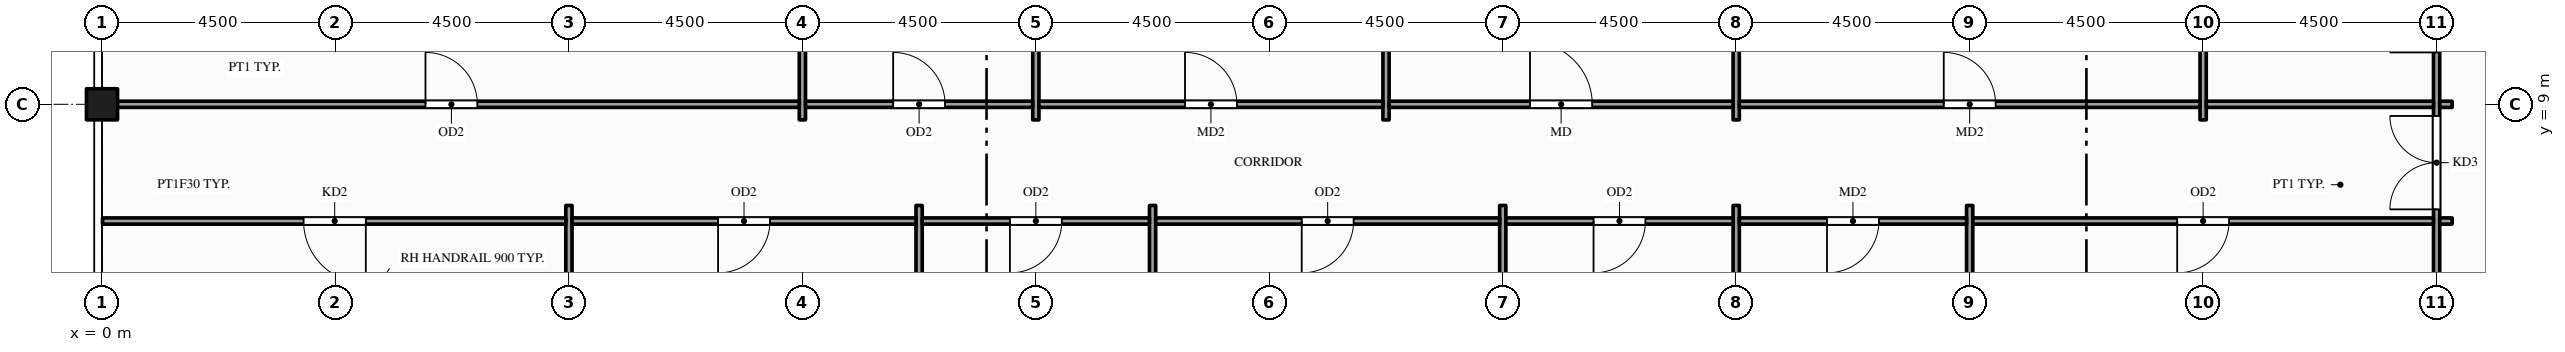
"""IFC4 building model, lengths in metres.
Left out: names, types, materials, properties, quantities, classifications, styles, units other than length and angle.
Written with IfcOpenShell. Run it as: python <this file> out.ifc"""

import sys

from ifc_helpers import new_model, si_unit, direction, frame, frame_2d, origin, origin_2d, place, context, subcontext, project, spatial, rectangle, hollow_rectangle, extrude, element, fill, save


model = new_model("IFC4")
c1 = context("Model", 3, precision=1e-05, world=origin(), true_north=direction((0.0, 1.0)))
c2 = subcontext(c1, "Body", "Model", "MODEL_VIEW")
j1 = project(units=[si_unit("LENGTHUNIT", "METRE"), si_unit("PLANEANGLEUNIT", "RADIAN")], contexts=[c1])
p1 = place(None, origin())
s1 = spatial("IfcSite", under=j1, at=p1, CompositionType="ELEMENT")
p2 = place(p1, origin())
s2 = spatial("IfcBuilding", under=s1, at=p2, CompositionType="ELEMENT")
p3 = place(p2, frame((0.0, 0.0, 336.5)))
s3 = spatial("IfcBuildingStorey", under=s2, at=p3, CompositionType="ELEMENT", Elevation=336.5)
p4 = place(p3, frame((0.0, 9.0, -0.15), z_axis=(0.0, 0.0, 1.0), x_axis=(1.0, 0.0, 0.0)))
e1 = element("IfcColumn", 1, at=p4, inside=s3, PredefinedType="COLUMN", context=c2, shape_type="SweptSolid", body=[
    extrude(hollow_rectangle(XDim=0.6, YDim=0.6, WallThickness=0.03, at=origin_2d()), origin(), (0.0, 0.0, 1.0), 4.5),
])
p5 = place(p3, frame((9.0, 3.875, 0.0), z_axis=(0.0, 0.0, 1.0), x_axis=(0.0, 1.0, 0.0)))
e2 = element("IfcWall", 2, at=p5, inside=s3, PredefinedType="PARTITIONING", context=c2, shape_type="SweptSolid", body=[
    extrude(rectangle(XDim=3.175, YDim=0.12, at=frame_2d((1.587, 0.0))), origin(), (0.0, 0.0, 1.0), 3.359),
])
p6 = place(p3, frame((13.5, 8.7, 0.0), z_axis=(0.0, 0.0, 1.0), x_axis=(0.0, 1.0, 0.0)))
e3 = element("IfcWall", 3, at=p6, inside=s3, PredefinedType="PARTITIONING", context=c2, shape_type="SweptSolid", body=[
    extrude(rectangle(XDim=13.79, YDim=0.12, at=frame_2d((6.895, 0.0))), origin(), (0.0, 0.0, 1.0), 3.359),
])
p7 = place(p3, frame((15.75, 0.01, 0.0), z_axis=(0.0, 0.0, 1.0), x_axis=(0.0, 1.0, 0.0)))
e4 = element("IfcWall", 4, at=p7, inside=s3, PredefinedType="PARTITIONING", context=c2, shape_type="SweptSolid", body=[
    extrude(rectangle(XDim=7.04, YDim=0.12, at=frame_2d((3.52, 0.0))), origin(), (0.0, 0.0, 1.0), 3.359),
])
p8 = place(p3, frame((18.0, 8.7, 0.0), z_axis=(0.0, 0.0, 1.0), x_axis=(0.0, 1.0, 0.0)))
e5 = element("IfcWall", 5, at=p8, inside=s3, PredefinedType="PARTITIONING", context=c2, shape_type="SweptSolid", body=[
    extrude(rectangle(XDim=13.79, YDim=0.12, at=frame_2d((6.895, 0.0))), origin(), (0.0, 0.0, 1.0), 3.359),
])
p9 = place(p3, frame((20.25, 0.01, 0.0), z_axis=(0.0, 0.0, 1.0), x_axis=(0.0, 1.0, 0.0)))
e6 = element("IfcWall", 6, at=p9, inside=s3, PredefinedType="PARTITIONING", context=c2, shape_type="SweptSolid", body=[
    extrude(rectangle(XDim=7.04, YDim=0.12, at=frame_2d((3.52, 0.0))), origin(), (0.0, 0.0, 1.0), 3.359),
])
p10 = place(p3, frame((24.75, 8.7, 0.0), z_axis=(0.0, 0.0, 1.0), x_axis=(0.0, 1.0, 0.0)))
e7 = element("IfcWall", 7, at=p10, inside=s3, PredefinedType="PARTITIONING", context=c2, shape_type="SweptSolid", body=[
    extrude(rectangle(XDim=13.79, YDim=0.12, at=frame_2d((6.895, 0.0))), origin(), (0.0, 0.0, 1.0), 3.359),
])
for number, where, z_axis, x_axis in (
    (8, (27.0, 0.01, 0.0), (0.0, 0.0, 1.0), (0.0, 1.0, 0.0)),
    (9, (31.5, 0.01, 0.0), (0.0, 0.0, 1.0), (0.0, 1.0, 0.0)),
):
    element("IfcWall", number, at=place(p3, frame(where, z_axis=z_axis, x_axis=x_axis)), inside=s3, PredefinedType="PARTITIONING", context=c2, shape_type="SweptSolid", body=[
        extrude(rectangle(XDim=7.04, YDim=0.12, at=frame_2d((3.52, 0.0))), origin(), (0.0, 0.0, 1.0), 3.359),
    ])
p11 = place(p3, frame((31.5, 8.7, 0.0), z_axis=(0.0, 0.0, 1.0), x_axis=(0.0, 1.0, 0.0)))
e10 = element("IfcWall", 10, at=p11, inside=s3, PredefinedType="PARTITIONING", context=c2, shape_type="SweptSolid", body=[
    extrude(rectangle(XDim=13.79, YDim=0.12, at=frame_2d((6.895, 0.0))), origin(), (0.0, 0.0, 1.0), 3.359),
])
p12 = place(p3, frame((36.0, 0.01, 0.0), z_axis=(0.0, 0.0, 1.0), x_axis=(0.0, 1.0, 0.0)))
e11 = element("IfcWall", 11, at=p12, inside=s3, PredefinedType="PARTITIONING", context=c2, shape_type="SweptSolid", body=[
    extrude(rectangle(XDim=7.04, YDim=0.12, at=frame_2d((3.52, 0.0))), origin(), (0.0, 0.0, 1.0), 3.359),
])
p13 = place(p3, frame((40.5, 8.7, 0.0), z_axis=(0.0, 0.0, 1.0), x_axis=(0.0, 1.0, 0.0)))
e12 = element("IfcWall", 12, at=p13, inside=s3, PredefinedType="PARTITIONING", context=c2, shape_type="SweptSolid", body=[
    extrude(rectangle(XDim=13.79, YDim=0.12, at=frame_2d((6.895, 0.0))), origin(), (0.0, 0.0, 1.0), 3.359),
])
p14 = place(p3, frame((45.0, 0.01, 0.0), z_axis=(0.0, 0.0, 1.0), x_axis=(0.0, 1.0, 0.0)))
e13 = element("IfcWall", 13, at=p14, inside=s3, PredefinedType="PARTITIONING", context=c2, shape_type="SweptSolid", body=[
    extrude(rectangle(XDim=22.48, YDim=0.12, at=frame_2d((11.24, 0.0))), origin(), (0.0, 0.0, 1.0), 3.359),
])
p15 = place(p14, frame((6.965, 0.0, 0.0)))
e14 = element("IfcOpeningElement", 14, at=p15, cuts=e13, PredefinedType="OPENING", context=c2, shape_type="SweptSolid", body=[
    extrude(rectangle(XDim=1.8, YDim=2.1, at=frame_2d((0.9, 1.05))), frame((0.0, 0.07, 0.0), z_axis=(0.0, -1.0, 0.0), x_axis=(1.0, 0.0, 0.0)), (0.0, 0.0, 1.0), 0.14),
])
p16 = place(p14, frame((9.99, 0.0, 0.0)))
e15 = element("IfcOpeningElement", 15, at=p16, cuts=e13, PredefinedType="OPENING", context=c2, shape_type="SweptSolid", body=[
    extrude(rectangle(XDim=0.9, YDim=2.1, at=frame_2d((0.45, 1.05))), frame((0.0, 0.07, 0.0), z_axis=(0.0, -1.0, 0.0), x_axis=(1.0, 0.0, 0.0)), (0.0, 0.0, 1.0), 0.14),
])
p17 = place(p14, frame((15.29, 0.0, 0.0)))
e16 = element("IfcOpeningElement", 16, at=p17, cuts=e13, PredefinedType="OPENING", context=c2, shape_type="SweptSolid", body=[
    extrude(rectangle(XDim=0.9, YDim=2.1, at=frame_2d((0.45, 1.05))), frame((0.0, 0.07, 0.0), z_axis=(0.0, -1.0, 0.0), x_axis=(1.0, 0.0, 0.0)), (0.0, 0.0, 1.0), 0.14),
])
p18 = place(p14, frame((20.49, 0.0, 0.0)))
e17 = element("IfcOpeningElement", 17, at=p18, cuts=e13, PredefinedType="OPENING", context=c2, shape_type="SweptSolid", body=[
    extrude(rectangle(XDim=1.0, YDim=2.1, at=frame_2d((0.5, 1.05))), frame((0.0, 0.07, 0.0), z_axis=(0.0, -1.0, 0.0), x_axis=(1.0, 0.0, 0.0)), (0.0, 0.0, 1.0), 0.14),
])
p19 = place(p3, frame((0.01, 6.75, 0.0), z_axis=(0.0, 0.0, 1.0), x_axis=(1.0, 0.0, 0.0)))
e18 = element("IfcWall", 18, at=p19, inside=s3, PredefinedType="PARTITIONING", context=c2, shape_type="SweptSolid", body=[
    extrude(rectangle(XDim=8.93, YDim=0.12, at=frame_2d((4.465, 0.0))), origin(), (0.0, 0.0, 1.0), 3.359),
])
p20 = place(p19, frame((3.875, 0.0, 0.0)))
e19 = element("IfcOpeningElement", 19, at=p20, cuts=e18, PredefinedType="OPENING", context=c2, shape_type="SweptSolid", body=[
    extrude(rectangle(XDim=1.2, YDim=2.1, at=frame_2d((0.6, 1.05))), frame((0.0, 0.07, 0.0), z_axis=(0.0, -1.0, 0.0), x_axis=(1.0, 0.0, 0.0)), (0.0, 0.0, 1.0), 0.14),
])
p21 = place(p3, frame((9.06, 6.75, 0.0), z_axis=(0.0, 0.0, 1.0), x_axis=(1.0, 0.0, 0.0)))
e20 = element("IfcWall", 20, at=p21, inside=s3, PredefinedType="PARTITIONING", context=c2, shape_type="SweptSolid", body=[
    extrude(rectangle(XDim=6.63, YDim=0.12, at=frame_2d((3.315, 0.0))), origin(), (0.0, 0.0, 1.0), 3.359),
])
p22 = place(p21, frame((2.815, 0.0, 0.0)))
e21 = element("IfcOpeningElement", 21, at=p22, cuts=e20, PredefinedType="OPENING", context=c2, shape_type="SweptSolid", body=[
    extrude(rectangle(XDim=1.0, YDim=2.1, at=frame_2d((0.5, 1.05))), frame((0.0, 0.07, 0.0), z_axis=(0.0, -1.0, 0.0), x_axis=(1.0, 0.0, 0.0)), (0.0, 0.0, 1.0), 0.14),
])
p23 = place(p3, frame((15.81, 6.75, 0.0), z_axis=(0.0, 0.0, 1.0), x_axis=(1.0, 0.0, 0.0)))
e22 = element("IfcWall", 22, at=p23, inside=s3, PredefinedType="PARTITIONING", context=c2, shape_type="SweptSolid", body=[
    extrude(rectangle(XDim=4.38, YDim=0.12, at=frame_2d((2.19, 0.0))), origin(), (0.0, 0.0, 1.0), 3.359),
])
p24 = place(p23, frame((1.69, 0.0, 0.0)))
e23 = element("IfcOpeningElement", 23, at=p24, cuts=e22, PredefinedType="OPENING", context=c2, shape_type="SweptSolid", body=[
    extrude(rectangle(XDim=1.0, YDim=2.1, at=frame_2d((0.5, 1.05))), frame((0.0, 0.07, 0.0), z_axis=(0.0, -1.0, 0.0), x_axis=(1.0, 0.0, 0.0)), (0.0, 0.0, 1.0), 0.14),
])
p25 = place(p3, frame((20.31, 6.75, 0.0), z_axis=(0.0, 0.0, 1.0), x_axis=(1.0, 0.0, 0.0)))
e24 = element("IfcWall", 24, at=p25, inside=s3, PredefinedType="PARTITIONING", context=c2, shape_type="SweptSolid", body=[
    extrude(rectangle(XDim=6.63, YDim=0.12, at=frame_2d((3.315, 0.0))), origin(), (0.0, 0.0, 1.0), 3.359),
])
p26 = place(p25, frame((2.815, 0.0, 0.0)))
e25 = element("IfcOpeningElement", 25, at=p26, cuts=e24, PredefinedType="OPENING", context=c2, shape_type="SweptSolid", body=[
    extrude(rectangle(XDim=1.0, YDim=2.1, at=frame_2d((0.5, 1.05))), frame((0.0, 0.07, 0.0), z_axis=(0.0, -1.0, 0.0), x_axis=(1.0, 0.0, 0.0)), (0.0, 0.0, 1.0), 0.14),
])
p27 = place(p3, frame((27.06, 6.75, 0.0), z_axis=(0.0, 0.0, 1.0), x_axis=(1.0, 0.0, 0.0)))
e26 = element("IfcWall", 26, at=p27, inside=s3, PredefinedType="PARTITIONING", context=c2, shape_type="SweptSolid", body=[
    extrude(rectangle(XDim=4.38, YDim=0.12, at=frame_2d((2.19, 0.0))), origin(), (0.0, 0.0, 1.0), 3.359),
])
p28 = place(p27, frame((1.69, 0.0, 0.0)))
e27 = element("IfcOpeningElement", 27, at=p28, cuts=e26, PredefinedType="OPENING", context=c2, shape_type="SweptSolid", body=[
    extrude(rectangle(XDim=1.0, YDim=2.1, at=frame_2d((0.5, 1.05))), frame((0.0, 0.07, 0.0), z_axis=(0.0, -1.0, 0.0), x_axis=(1.0, 0.0, 0.0)), (0.0, 0.0, 1.0), 0.14),
])
p29 = place(p3, frame((31.56, 6.75, 0.0), z_axis=(0.0, 0.0, 1.0), x_axis=(1.0, 0.0, 0.0)))
e28 = element("IfcWall", 28, at=p29, inside=s3, PredefinedType="PARTITIONING", context=c2, shape_type="SweptSolid", body=[
    extrude(rectangle(XDim=4.38, YDim=0.12, at=frame_2d((2.19, 0.0))), origin(), (0.0, 0.0, 1.0), 3.359),
])
p30 = place(p29, frame((1.69, 0.0, 0.0)))
e29 = element("IfcOpeningElement", 29, at=p30, cuts=e28, PredefinedType="OPENING", context=c2, shape_type="SweptSolid", body=[
    extrude(rectangle(XDim=1.0, YDim=2.1, at=frame_2d((0.5, 1.05))), frame((0.0, 0.07, 0.0), z_axis=(0.0, -1.0, 0.0), x_axis=(1.0, 0.0, 0.0)), (0.0, 0.0, 1.0), 0.14),
])
p31 = place(p3, frame((36.06, 6.75, 0.0), z_axis=(0.0, 0.0, 1.0), x_axis=(1.0, 0.0, 0.0)))
e30 = element("IfcWall", 30, at=p31, inside=s3, PredefinedType="PARTITIONING", context=c2, shape_type="SweptSolid", body=[
    extrude(rectangle(XDim=8.88, YDim=0.12, at=frame_2d((4.44, 0.0))), origin(), (0.0, 0.0, 1.0), 3.359),
])
p32 = place(p31, frame((3.94, 0.0, 0.0)))
e31 = element("IfcOpeningElement", 31, at=p32, cuts=e30, PredefinedType="OPENING", context=c2, shape_type="SweptSolid", body=[
    extrude(rectangle(XDim=1.0, YDim=2.1, at=frame_2d((0.5, 1.05))), frame((0.0, 0.07, 0.0), z_axis=(0.0, -1.0, 0.0), x_axis=(1.0, 0.0, 0.0)), (0.0, 0.0, 1.0), 0.14),
])
p33 = place(p3, frame((45.06, 6.75, 0.0), z_axis=(0.0, 0.0, 1.0), x_axis=(1.0, 0.0, 0.0)))
e32 = element("IfcWall", 32, at=p33, inside=s3, PredefinedType="PARTITIONING", context=c2, shape_type="SweptSolid", body=[
    extrude(rectangle(XDim=0.24, YDim=0.12, at=frame_2d((0.12, 0.0))), origin(), (0.0, 0.0, 1.0), 3.359),
])
p34 = place(p3, frame((0.01, 9.0, 0.0), z_axis=(0.0, 0.0, 1.0), x_axis=(1.0, 0.0, 0.0)))
e33 = element("IfcWall", 33, at=p34, inside=s3, PredefinedType="PARTITIONING", context=c2, shape_type="SweptSolid", body=[
    extrude(rectangle(XDim=13.43, YDim=0.12, at=frame_2d((6.715, 0.0))), origin(), (0.0, 0.0, 1.0), 3.359),
])
p35 = place(p34, frame((6.225, 0.0, 0.0)))
e34 = element("IfcOpeningElement", 34, at=p35, cuts=e33, PredefinedType="OPENING", context=c2, shape_type="SweptSolid", body=[
    extrude(rectangle(XDim=1.0, YDim=2.1, at=frame_2d((0.5, 1.05))), frame((0.0, 0.07, 0.0), z_axis=(0.0, -1.0, 0.0), x_axis=(1.0, 0.0, 0.0)), (0.0, 0.0, 1.0), 0.14),
])
p36 = place(p3, frame((13.56, 9.0, 0.0), z_axis=(0.0, 0.0, 1.0), x_axis=(1.0, 0.0, 0.0)))
e35 = element("IfcWall", 35, at=p36, inside=s3, PredefinedType="PARTITIONING", context=c2, shape_type="SweptSolid", body=[
    extrude(rectangle(XDim=4.38, YDim=0.12, at=frame_2d((2.19, 0.0))), origin(), (0.0, 0.0, 1.0), 3.359),
])
p37 = place(p36, frame((1.69, 0.0, 0.0)))
e36 = element("IfcOpeningElement", 36, at=p37, cuts=e35, PredefinedType="OPENING", context=c2, shape_type="SweptSolid", body=[
    extrude(rectangle(XDim=1.0, YDim=2.1, at=frame_2d((0.5, 1.05))), frame((0.0, 0.07, 0.0), z_axis=(0.0, -1.0, 0.0), x_axis=(1.0, 0.0, 0.0)), (0.0, 0.0, 1.0), 0.14),
])
p38 = place(p3, frame((18.06, 9.0, 0.0), z_axis=(0.0, 0.0, 1.0), x_axis=(1.0, 0.0, 0.0)))
e37 = element("IfcWall", 37, at=p38, inside=s3, PredefinedType="PARTITIONING", context=c2, shape_type="SweptSolid", body=[
    extrude(rectangle(XDim=6.63, YDim=0.12, at=frame_2d((3.315, 0.0))), origin(), (0.0, 0.0, 1.0), 3.359),
])
p39 = place(p38, frame((2.815, 0.0, 0.0)))
e38 = element("IfcOpeningElement", 38, at=p39, cuts=e37, PredefinedType="OPENING", context=c2, shape_type="SweptSolid", body=[
    extrude(rectangle(XDim=1.0, YDim=2.1, at=frame_2d((0.5, 1.05))), frame((0.0, 0.07, 0.0), z_axis=(0.0, -1.0, 0.0), x_axis=(1.0, 0.0, 0.0)), (0.0, 0.0, 1.0), 0.14),
])
p40 = place(p3, frame((24.81, 9.0, 0.0), z_axis=(0.0, 0.0, 1.0), x_axis=(1.0, 0.0, 0.0)))
e39 = element("IfcWall", 39, at=p40, inside=s3, PredefinedType="PARTITIONING", context=c2, shape_type="SweptSolid", body=[
    extrude(rectangle(XDim=6.63, YDim=0.12, at=frame_2d((3.315, 0.0))), origin(), (0.0, 0.0, 1.0), 3.359),
])
p41 = place(p40, frame((2.715, 0.0, 0.0)))
e40 = element("IfcOpeningElement", 40, at=p41, cuts=e39, PredefinedType="OPENING", context=c2, shape_type="SweptSolid", body=[
    extrude(rectangle(XDim=1.2, YDim=2.1, at=frame_2d((0.6, 1.05))), frame((0.0, 0.07, 0.0), z_axis=(0.0, -1.0, 0.0), x_axis=(1.0, 0.0, 0.0)), (0.0, 0.0, 1.0), 0.14),
])
p42 = place(p3, frame((31.56, 9.0, 0.0), z_axis=(0.0, 0.0, 1.0), x_axis=(1.0, 0.0, 0.0)))
e41 = element("IfcWall", 41, at=p42, inside=s3, PredefinedType="PARTITIONING", context=c2, shape_type="SweptSolid", body=[
    extrude(rectangle(XDim=8.88, YDim=0.12, at=frame_2d((4.44, 0.0))), origin(), (0.0, 0.0, 1.0), 3.359),
])
p43 = place(p42, frame((3.94, 0.0, 0.0)))
e42 = element("IfcOpeningElement", 42, at=p43, cuts=e41, PredefinedType="OPENING", context=c2, shape_type="SweptSolid", body=[
    extrude(rectangle(XDim=1.0, YDim=2.1, at=frame_2d((0.5, 1.05))), frame((0.0, 0.07, 0.0), z_axis=(0.0, -1.0, 0.0), x_axis=(1.0, 0.0, 0.0)), (0.0, 0.0, 1.0), 0.14),
])
p44 = place(p3, frame((40.56, 9.0, 0.0), z_axis=(0.0, 0.0, 1.0), x_axis=(1.0, 0.0, 0.0)))
e43 = element("IfcWall", 43, at=p44, inside=s3, PredefinedType="PARTITIONING", context=c2, shape_type="SweptSolid", body=[
    extrude(rectangle(XDim=4.38, YDim=0.12, at=frame_2d((2.19, 0.0))), origin(), (0.0, 0.0, 1.0), 3.359),
])
p45 = place(p3, frame((45.06, 9.0, 0.0), z_axis=(0.0, 0.0, 1.0), x_axis=(1.0, 0.0, 0.0)))
e44 = element("IfcWall", 44, at=p45, inside=s3, PredefinedType="PARTITIONING", context=c2, shape_type="SweptSolid", body=[
    extrude(rectangle(XDim=0.24, YDim=0.12, at=frame_2d((0.12, 0.0))), origin(), (0.0, 0.0, 1.0), 3.359),
])
p46 = place(p15, origin())
e45 = element("IfcDoor", 45, at=p46, inside=s3, OperationType="DOUBLE_DOOR_SINGLE_SWING", PredefinedType="DOOR", context=c2, shape_type="SweptSolid", body=[
    extrude(rectangle(XDim=1.8, YDim=2.1, at=frame_2d((0.9, 1.05))), frame((0.0, 0.025, 0.0), z_axis=(0.0, -1.0, 0.0), x_axis=(1.0, 0.0, 0.0)), (0.0, 0.0, 1.0), 0.05),
])
fill(e14, e45)
p47 = place(p20, origin())
e46 = element("IfcDoor", 46, at=p47, inside=s3, OperationType="SINGLE_SWING_RIGHT", PredefinedType="DOOR", context=c2, shape_type="SweptSolid", body=[
    extrude(rectangle(XDim=1.2, YDim=2.1, at=frame_2d((0.6, 1.05))), frame((0.0, 0.025, 0.0), z_axis=(0.0, -1.0, 0.0), x_axis=(1.0, 0.0, 0.0)), (0.0, 0.0, 1.0), 0.05),
])
fill(e19, e46)
p48 = place(p22, origin())
e47 = element("IfcDoor", 47, at=p48, inside=s3, OperationType="SINGLE_SWING_LEFT", PredefinedType="DOOR", context=c2, shape_type="SweptSolid", body=[
    extrude(rectangle(XDim=1.0, YDim=2.1, at=frame_2d((0.5, 1.05))), frame((0.0, 0.025, 0.0), z_axis=(0.0, -1.0, 0.0), x_axis=(1.0, 0.0, 0.0)), (0.0, 0.0, 1.0), 0.05),
])
fill(e21, e47)
p49 = place(p24, origin())
e48 = element("IfcDoor", 48, at=p49, inside=s3, OperationType="SINGLE_SWING_LEFT", PredefinedType="DOOR", context=c2, shape_type="SweptSolid", body=[
    extrude(rectangle(XDim=1.0, YDim=2.1, at=frame_2d((0.5, 1.05))), frame((0.0, 0.025, 0.0), z_axis=(0.0, -1.0, 0.0), x_axis=(1.0, 0.0, 0.0)), (0.0, 0.0, 1.0), 0.05),
])
fill(e23, e48)
p50 = place(p26, origin())
e49 = element("IfcDoor", 49, at=p50, inside=s3, OperationType="SINGLE_SWING_LEFT", PredefinedType="DOOR", context=c2, shape_type="SweptSolid", body=[
    extrude(rectangle(XDim=1.0, YDim=2.1, at=frame_2d((0.5, 1.05))), frame((0.0, 0.025, 0.0), z_axis=(0.0, -1.0, 0.0), x_axis=(1.0, 0.0, 0.0)), (0.0, 0.0, 1.0), 0.05),
])
fill(e25, e49)
p51 = place(p28, origin())
e50 = element("IfcDoor", 50, at=p51, inside=s3, OperationType="SINGLE_SWING_LEFT", PredefinedType="DOOR", context=c2, shape_type="SweptSolid", body=[
    extrude(rectangle(XDim=1.0, YDim=2.1, at=frame_2d((0.5, 1.05))), frame((0.0, 0.025, 0.0), z_axis=(0.0, -1.0, 0.0), x_axis=(1.0, 0.0, 0.0)), (0.0, 0.0, 1.0), 0.05),
])
fill(e27, e50)
p52 = place(p30, origin())
e51 = element("IfcDoor", 51, at=p52, inside=s3, OperationType="SINGLE_SWING_LEFT", PredefinedType="DOOR", context=c2, shape_type="SweptSolid", body=[
    extrude(rectangle(XDim=1.0, YDim=2.1, at=frame_2d((0.5, 1.05))), frame((0.0, 0.025, 0.0), z_axis=(0.0, -1.0, 0.0), x_axis=(1.0, 0.0, 0.0)), (0.0, 0.0, 1.0), 0.05),
])
fill(e29, e51)
p53 = place(p32, origin())
e52 = element("IfcDoor", 52, at=p53, inside=s3, OperationType="SINGLE_SWING_LEFT", PredefinedType="DOOR", context=c2, shape_type="SweptSolid", body=[
    extrude(rectangle(XDim=1.0, YDim=2.1, at=frame_2d((0.5, 1.05))), frame((0.0, 0.025, 0.0), z_axis=(0.0, -1.0, 0.0), x_axis=(1.0, 0.0, 0.0)), (0.0, 0.0, 1.0), 0.05),
])
fill(e31, e52)
p54 = place(p35, origin())
e53 = element("IfcDoor", 53, at=p54, inside=s3, OperationType="SINGLE_SWING_LEFT", PredefinedType="DOOR", context=c2, shape_type="SweptSolid", body=[
    extrude(rectangle(XDim=1.0, YDim=2.1, at=frame_2d((0.5, 1.05))), frame((0.0, 0.025, 0.0), z_axis=(0.0, -1.0, 0.0), x_axis=(1.0, 0.0, 0.0)), (0.0, 0.0, 1.0), 0.05),
])
fill(e34, e53)
p55 = place(p37, origin())
e54 = element("IfcDoor", 54, at=p55, inside=s3, OperationType="SINGLE_SWING_LEFT", PredefinedType="DOOR", context=c2, shape_type="SweptSolid", body=[
    extrude(rectangle(XDim=1.0, YDim=2.1, at=frame_2d((0.5, 1.05))), frame((0.0, 0.025, 0.0), z_axis=(0.0, -1.0, 0.0), x_axis=(1.0, 0.0, 0.0)), (0.0, 0.0, 1.0), 0.05),
])
fill(e36, e54)
p56 = place(p39, origin())
e55 = element("IfcDoor", 55, at=p56, inside=s3, OperationType="SINGLE_SWING_LEFT", PredefinedType="DOOR", context=c2, shape_type="SweptSolid", body=[
    extrude(rectangle(XDim=1.0, YDim=2.1, at=frame_2d((0.5, 1.05))), frame((0.0, 0.025, 0.0), z_axis=(0.0, -1.0, 0.0), x_axis=(1.0, 0.0, 0.0)), (0.0, 0.0, 1.0), 0.05),
])
fill(e38, e55)
p57 = place(p41, origin())
e56 = element("IfcDoor", 56, at=p57, inside=s3, OperationType="SINGLE_SWING_LEFT", PredefinedType="DOOR", context=c2, shape_type="SweptSolid", body=[
    extrude(rectangle(XDim=1.2, YDim=2.1, at=frame_2d((0.6, 1.05))), frame((0.0, 0.025, 0.0), z_axis=(0.0, -1.0, 0.0), x_axis=(1.0, 0.0, 0.0)), (0.0, 0.0, 1.0), 0.05),
])
fill(e40, e56)
p58 = place(p43, origin())
e57 = element("IfcDoor", 57, at=p58, inside=s3, OperationType="SINGLE_SWING_LEFT", PredefinedType="DOOR", context=c2, shape_type="SweptSolid", body=[
    extrude(rectangle(XDim=1.0, YDim=2.1, at=frame_2d((0.5, 1.05))), frame((0.0, 0.025, 0.0), z_axis=(0.0, -1.0, 0.0), x_axis=(1.0, 0.0, 0.0)), (0.0, 0.0, 1.0), 0.05),
])
fill(e42, e57)
save(model, sys.argv[1])
